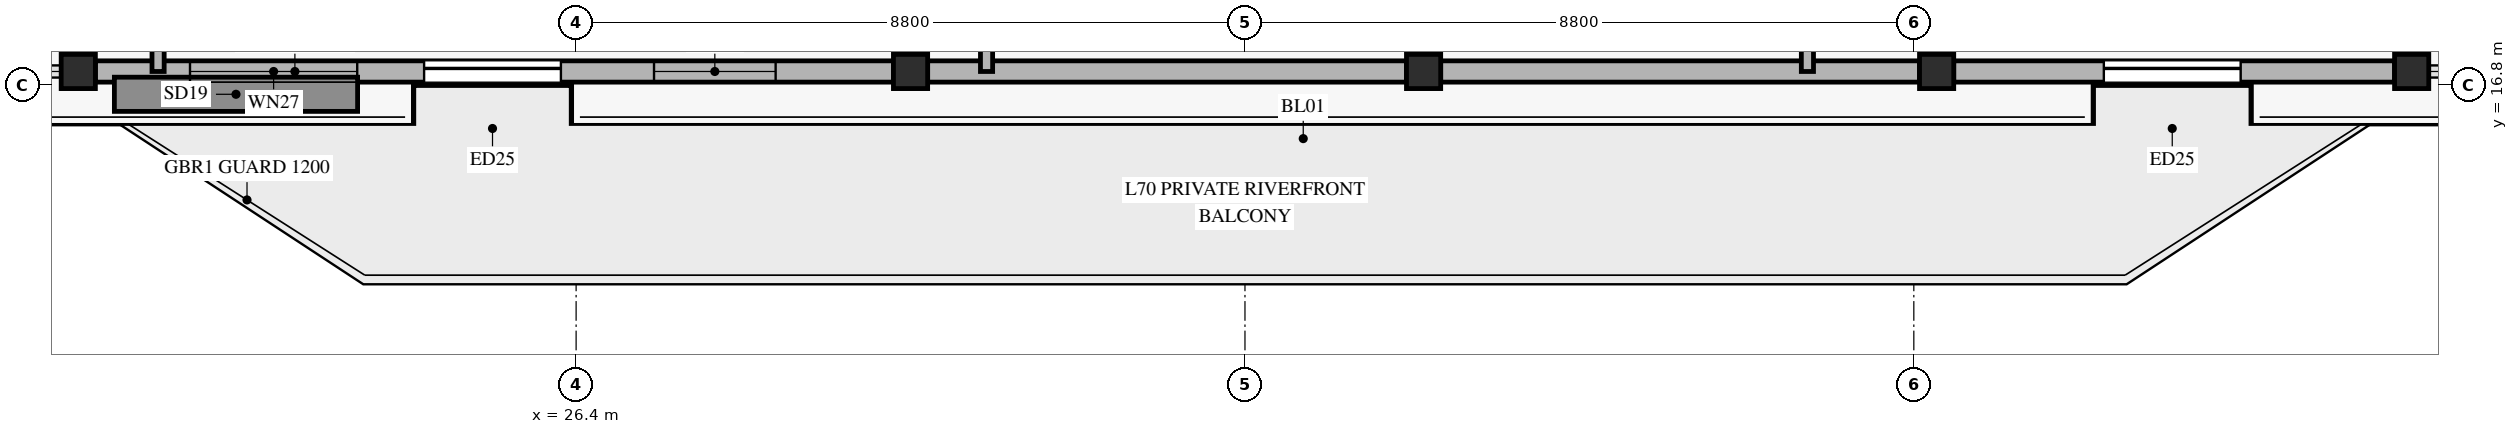
"""IFC4 building model, lengths in metres.
Left out: names, types, materials, properties, quantities, classifications, styles, units other than length and angle.
Written with IfcOpenShell. Run it as: python <this file> out.ifc"""

import sys

from ifc_helpers import new_model, si_unit, direction, frame, frame_2d, origin, origin_2d, place, context, subcontext, project, spatial, rectangle, hollow_rectangle, extrude, source, transform, mapped, element, fill, save


model = new_model("IFC4")
c1 = context("Model", 3, precision=1e-05, world=origin(), true_north=direction((0.0, 1.0)))
c2 = subcontext(c1, "Body", "Model", "MODEL_VIEW")
j1 = project(units=[si_unit("LENGTHUNIT", "METRE"), si_unit("PLANEANGLEUNIT", "RADIAN")], contexts=[c1])
p1 = place(None, origin())
s1 = spatial("IfcSite", under=j1, at=p1, CompositionType="ELEMENT")
p2 = place(p1, origin())
s2 = spatial("IfcBuilding", under=s1, at=p2, CompositionType="ELEMENT")
p3 = place(p2, frame((0.0, 0.0, 272.3)))
s3 = spatial("IfcBuildingStorey", under=s2, at=p3, CompositionType="ELEMENT", Elevation=272.3)
m1 = source(origin(), c2, "Body", "SweptSolid", [
    extrude(hollow_rectangle(XDim=0.45, YDim=0.45, WallThickness=0.022, at=origin_2d()), origin(), (0.0, 0.0, 1.0), 3.185),
])
for number, where, z_axis, x_axis in (
    (1, (19.85, 16.976, 0.0), (0.0, 0.0, 1.0), (1.0, 0.0, 0.0)),
    (2, (30.8, 16.976, 0.0), (0.0, 0.0, 1.0), (1.0, 0.0, 0.0)),
    (3, (37.55, 16.976, 0.0), (0.0, 0.0, 1.0), (1.0, 0.0, 0.0)),
    (4, (44.3, 16.976, 0.0), (0.0, 0.0, 1.0), (1.0, 0.0, 0.0)),
    (5, (50.55, 16.976, 0.0), (0.0, 0.0, 1.0), (1.0, 0.0, 0.0)),
):
    element("IfcColumn", number, at=place(p3, frame(where, z_axis=z_axis, x_axis=x_axis)), inside=s3, PredefinedType="COLUMN", context=c2, shape_type="MappedRepresentation", body=[
        mapped(m1, transform((0.0, 0.0, 0.0), x_axis=(1.0, 0.0, 0.0), y_axis=(0.0, 1.0, 0.0), z_axis=(0.0, 0.0, 1.0), scale=1.0)),
    ])
p4 = place(p3, frame((20.075, 16.976, 0.0), z_axis=(0.0, 0.0, 1.0), x_axis=(1.0, 0.0, 0.0)))
e6 = element("IfcWall", 6, at=p4, inside=s3, PredefinedType="SOLIDWALL", context=c2, shape_type="SweptSolid", body=[
    extrude(rectangle(XDim=10.5, YDim=0.28, at=frame_2d((5.25, 0.0))), origin(), (0.0, 0.0, 1.0), 2.815),
])
p5 = place(p4, frame((4.325, 0.0, 0.0)))
e7 = element("IfcOpeningElement", 7, at=p5, cuts=e6, PredefinedType="OPENING", context=c2, shape_type="SweptSolid", body=[
    extrude(rectangle(XDim=1.8, YDim=2.25, at=frame_2d((0.9, 1.125))), frame((0.0, 0.15, 0.0), z_axis=(0.0, -1.0, 0.0), x_axis=(1.0, 0.0, 0.0)), (0.0, 0.0, 1.0), 0.3),
])
p6 = place(p4, frame((1.245, 0.0, 0.45)))
e8 = element("IfcOpeningElement", 8, at=p6, cuts=e6, PredefinedType="OPENING", context=c2, shape_type="SweptSolid", body=[
    extrude(rectangle(XDim=2.2, YDim=2.1, at=frame_2d((1.1, 1.05))), frame((0.0, 0.15, 0.0), z_axis=(0.0, -1.0, 0.0), x_axis=(1.0, 0.0, 0.0)), (0.0, 0.0, 1.0), 0.3),
])
p7 = place(p4, frame((7.35, 0.0, 0.45)))
e9 = element("IfcOpeningElement", 9, at=p7, cuts=e6, PredefinedType="OPENING", context=c2, shape_type="SweptSolid", body=[
    extrude(rectangle(XDim=1.6, YDim=2.0, at=frame_2d((0.8, 1.0))), frame((0.0, 0.15, 0.0), z_axis=(0.0, -1.0, 0.0), x_axis=(1.0, 0.0, 0.0)), (0.0, 0.0, 1.0), 0.3),
])
for number, where, z_axis, x_axis in (
    (10, (31.025, 16.976, 0.0), (0.0, 0.0, 1.0), (1.0, 0.0, 0.0)),
    (11, (37.775, 16.976, 0.0), (0.0, 0.0, 1.0), (1.0, 0.0, 0.0)),
):
    element("IfcWall", number, at=place(p3, frame(where, z_axis=z_axis, x_axis=x_axis)), inside=s3, PredefinedType="SOLIDWALL", context=c2, shape_type="SweptSolid", body=[
        extrude(rectangle(XDim=6.3, YDim=0.28, at=frame_2d((3.15, 0.0))), origin(), (0.0, 0.0, 1.0), 2.815),
    ])
p8 = place(p3, frame((44.525, 16.976, 0.0), z_axis=(0.0, 0.0, 1.0), x_axis=(1.0, 0.0, 0.0)))
e12 = element("IfcWall", 12, at=p8, inside=s3, PredefinedType="SOLIDWALL", context=c2, shape_type="SweptSolid", body=[
    extrude(rectangle(XDim=5.8, YDim=0.28, at=frame_2d((2.9, 0.0))), origin(), (0.0, 0.0, 1.0), 2.815),
])
p9 = place(p8, frame((1.975, 0.0, 0.0)))
e13 = element("IfcOpeningElement", 13, at=p9, cuts=e12, PredefinedType="OPENING", context=c2, shape_type="SweptSolid", body=[
    extrude(rectangle(XDim=1.8, YDim=2.25, at=frame_2d((0.9, 1.125))), frame((0.0, 0.15, 0.0), z_axis=(0.0, -1.0, 0.0), x_axis=(1.0, 0.0, 0.0)), (0.0, 0.0, 1.0), 0.3),
])
for number, where, z_axis, x_axis in (
    (14, (20.9, 16.976, 0.0), (0.0, 0.0, 1.0), (0.0, 1.0, 0.0)),
    (15, (31.8, 16.976, 0.0), (0.0, 0.0, 1.0), (0.0, 1.0, 0.0)),
    (16, (42.6, 16.976, 0.0), (0.0, 0.0, 1.0), (0.0, 1.0, 0.0)),
):
    element("IfcWall", number, at=place(p3, frame(where, z_axis=z_axis, x_axis=x_axis)), inside=s3, PredefinedType="PARTITIONING", context=c2, shape_type="SweptSolid", body=[
        extrude(rectangle(XDim=18.024, YDim=0.16, at=frame_2d((9.012, 0.0))), origin(), (0.0, 0.0, 1.0), 2.77),
    ])
m2 = source(origin(), c2, "Body", "SweptSolid", [
    extrude(rectangle(XDim=1.8, YDim=2.25, at=frame_2d((0.9, 1.125))), frame((0.0, 0.025, 0.0), z_axis=(0.0, -1.0, 0.0), x_axis=(1.0, 0.0, 0.0)), (0.0, 0.0, 1.0), 0.05),
])
p10 = place(p5, origin())
e17 = element("IfcDoor", 17, at=p10, inside=s3, OperationType="SLIDING_TO_LEFT", PredefinedType="DOOR", context=c2, shape_type="MappedRepresentation", body=[
    mapped(m2, transform((0.0, 0.0, 0.0), x_axis=(1.0, 0.0, 0.0), y_axis=(0.0, 1.0, 0.0), z_axis=(0.0, 0.0, 1.0), scale=1.0)),
])
fill(e7, e17)
m3 = source(origin(), c2, "Body", "SweptSolid", [
    extrude(rectangle(XDim=2.2, YDim=2.1, at=frame_2d((1.1, 1.05))), frame((0.0, 0.03, 0.0), z_axis=(0.0, -1.0, 0.0), x_axis=(1.0, 0.0, 0.0)), (0.0, 0.0, 1.0), 0.06),
])
p11 = place(p6, origin())
e18 = element("IfcWindow", 18, at=p11, inside=s3, PartitioningType="SINGLE_PANEL", PredefinedType="WINDOW", context=c2, shape_type="MappedRepresentation", body=[
    mapped(m3, transform((0.0, 0.0, 0.0), x_axis=(1.0, 0.0, 0.0), y_axis=(0.0, 1.0, 0.0), z_axis=(0.0, 0.0, 1.0), scale=1.0)),
])
fill(e8, e18)
m4 = source(origin(), c2, "Body", "SweptSolid", [
    extrude(rectangle(XDim=1.6, YDim=2.0, at=frame_2d((0.8, 1.0))), frame((0.0, 0.03, 0.0), z_axis=(0.0, -1.0, 0.0), x_axis=(1.0, 0.0, 0.0)), (0.0, 0.0, 1.0), 0.06),
])
p12 = place(p7, origin())
e19 = element("IfcWindow", 19, at=p12, inside=s3, PartitioningType="SINGLE_PANEL", PredefinedType="WINDOW", context=c2, shape_type="MappedRepresentation", body=[
    mapped(m4, transform((0.0, 0.0, 0.0), x_axis=(1.0, 0.0, 0.0), y_axis=(0.0, 1.0, 0.0), z_axis=(0.0, 0.0, 1.0), scale=1.0)),
])
fill(e9, e19)
p13 = place(p9, origin())
e20 = element("IfcDoor", 20, at=p13, inside=s3, OperationType="SLIDING_TO_LEFT", PredefinedType="DOOR", context=c2, shape_type="MappedRepresentation", body=[
    mapped(m2, transform((0.0, 0.0, 0.0), x_axis=(1.0, 0.0, 0.0), y_axis=(0.0, 1.0, 0.0), z_axis=(0.0, 0.0, 1.0), scale=1.0)),
])
fill(e13, e20)
save(model, sys.argv[1])
